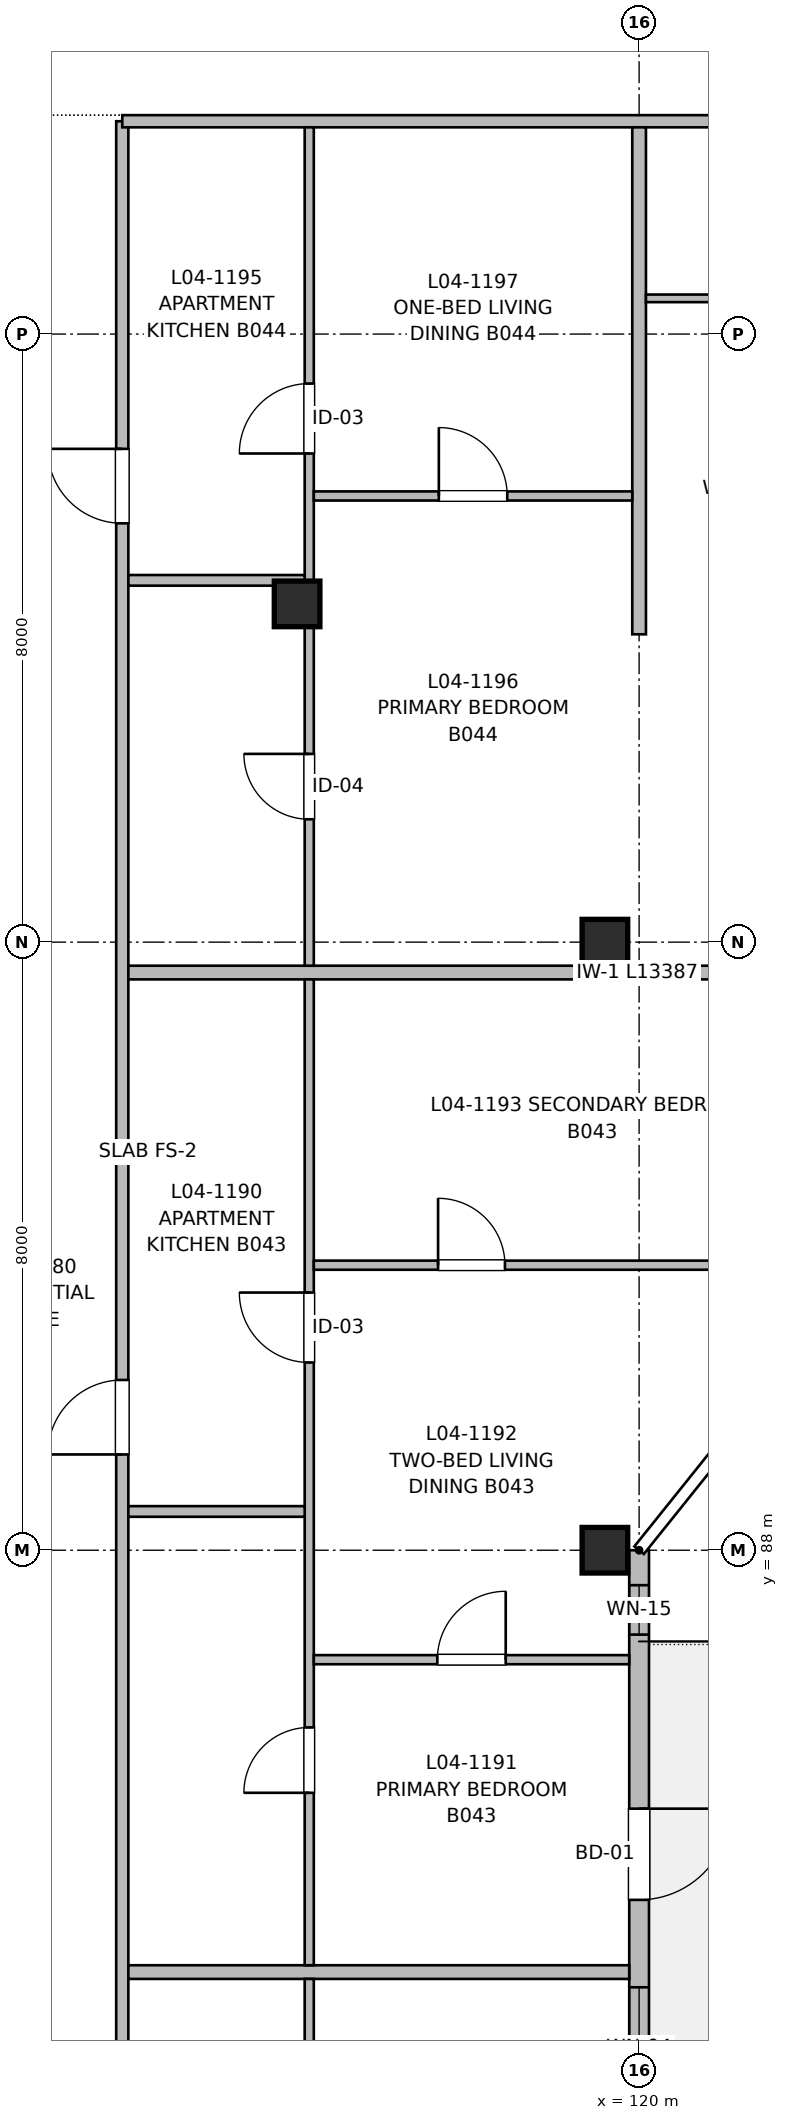
"""IFC4 building model, lengths in metres.
Left out: names, types, materials, properties, quantities, classifications, styles, units other than length and angle.
Written with IfcOpenShell. Run it as: python <this file> out.ifc"""

import sys

from ifc_helpers import new_model, si_unit, direction, frame, frame_2d, origin, origin_2d, place, context, subcontext, project, spatial, rectangle, extrude, element, fill, save


model = new_model("IFC4")
c1 = context("Model", 3, precision=1e-05, world=origin(), true_north=direction((0.0, 1.0)))
c2 = subcontext(c1, "Body", "Model", "MODEL_VIEW")
j1 = project(units=[si_unit("LENGTHUNIT", "METRE"), si_unit("PLANEANGLEUNIT", "RADIAN")], contexts=[c1])
p1 = place(None, origin())
s1 = spatial("IfcSite", under=j1, at=p1, CompositionType="ELEMENT")
p2 = place(p1, origin())
s2 = spatial("IfcBuilding", under=s1, at=p2, CompositionType="ELEMENT")
p3 = place(p2, frame((0.0, 0.0, 13.76)))
s3 = spatial("IfcBuildingStorey", under=s2, at=p3, CompositionType="ELEMENT", Elevation=13.76)
for number, where, z_axis, x_axis in (
    (1, (115.5, 100.45, 0.0), (0.0, 0.0, 1.0), (1.0, 0.0, 0.0)),
    (2, (119.55, 88.0, 0.0), (0.0, 0.0, 1.0), (1.0, 0.0, 0.0)),
    (3, (119.55, 96.0, 0.0), (0.0, 0.0, 1.0), (1.0, 0.0, 0.0)),
):
    element("IfcColumn", number, at=place(p3, frame(where, z_axis=z_axis, x_axis=x_axis)), inside=s3, PredefinedType="COLUMN", context=c2, shape_type="SweptSolid", body=[
        extrude(rectangle(XDim=0.6, YDim=0.6, at=origin_2d()), origin(), (0.0, 0.0, 1.0), 3.2),
    ])
p4 = place(p3, frame((120.0, 88.0, 0.0), z_axis=(0.0, 0.0, 1.0), x_axis=(0.0, -1.0, 0.0)))
e4 = element("IfcWall", 4, at=p4, inside=s3, PredefinedType="SOLIDWALL", context=c2, shape_type="SweptSolid", body=[
    extrude(rectangle(XDim=32.0, YDim=0.26, at=frame_2d((16.0, 0.0))), origin(), (0.0, 0.0, 1.0), 2.98),
])
p5 = place(p4, frame((3.4, 0.0, 0.0)))
e5 = element("IfcOpeningElement", 5, at=p5, cuts=e4, PredefinedType="OPENING", context=c2, shape_type="SweptSolid", body=[
    extrude(rectangle(XDim=1.2, YDim=2.2, at=frame_2d((0.6, 1.1))), frame((0.0, 0.14, 0.0), z_axis=(0.0, -1.0, 0.0), x_axis=(1.0, 0.0, 0.0)), (0.0, 0.0, 1.0), 0.28),
])
p6 = place(p4, frame((5.75, 0.0, 0.77)))
e6 = element("IfcOpeningElement", 6, at=p6, cuts=e4, PredefinedType="OPENING", context=c2, shape_type="SweptSolid", body=[
    extrude(rectangle(XDim=1.6, YDim=1.45, at=frame_2d((0.8, 0.725))), frame((0.0, 0.14, 0.0), z_axis=(0.0, -1.0, 0.0), x_axis=(1.0, 0.0, 0.0)), (0.0, 0.0, 1.0), 0.28),
])
p7 = place(p4, frame((11.275, 0.0, 0.77)))
e7 = element("IfcOpeningElement", 7, at=p7, cuts=e4, PredefinedType="OPENING", context=c2, shape_type="SweptSolid", body=[
    extrude(rectangle(XDim=1.45, YDim=1.45, at=frame_2d((0.725, 0.725))), frame((0.0, 0.14, 0.0), z_axis=(0.0, -1.0, 0.0), x_axis=(1.0, 0.0, 0.0)), (0.0, 0.0, 1.0), 0.28),
])
p8 = place(p4, frame((19.875, 0.0, 0.72)))
e8 = element("IfcOpeningElement", 8, at=p8, cuts=e4, PredefinedType="OPENING", context=c2, shape_type="SweptSolid", body=[
    extrude(rectangle(XDim=1.95, YDim=1.5, at=frame_2d((0.975, 0.75))), frame((0.0, 0.14, 0.0), z_axis=(0.0, -1.0, 0.0), x_axis=(1.0, 0.0, 0.0)), (0.0, 0.0, 1.0), 0.28),
])
p9 = place(p4, frame((26.7, 0.0, 0.67)))
e9 = element("IfcOpeningElement", 9, at=p9, cuts=e4, PredefinedType="OPENING", context=c2, shape_type="SweptSolid", body=[
    extrude(rectangle(XDim=2.6, YDim=1.55, at=frame_2d((1.3, 0.775))), frame((0.0, 0.14, 0.0), z_axis=(0.0, -1.0, 0.0), x_axis=(1.0, 0.0, 0.0)), (0.0, 0.0, 1.0), 0.28),
])
p10 = place(p4, frame((16.73, 0.0, 0.82)))
e10 = element("IfcOpeningElement", 10, at=p10, cuts=e4, PredefinedType="OPENING", context=c2, shape_type="SweptSolid", body=[
    extrude(rectangle(XDim=1.5, YDim=1.4, at=frame_2d((0.75, 0.7))), frame((0.0, 0.14, 0.0), z_axis=(0.0, -1.0, 0.0), x_axis=(1.0, 0.0, 0.0)), (0.0, 0.0, 1.0), 0.28),
])
p11 = place(p4, frame((0.46, 0.0, 0.9)))
e11 = element("IfcOpeningElement", 11, at=p11, cuts=e4, PredefinedType="OPENING", context=c2, shape_type="SweptSolid", body=[
    extrude(rectangle(XDim=0.65, YDim=0.95, at=frame_2d((0.325, 0.475))), frame((0.0, 0.14, 0.0), z_axis=(0.0, -1.0, 0.0), x_axis=(1.0, 0.0, 0.0)), (0.0, 0.0, 1.0), 0.28),
])
p12 = place(p3, frame((113.2, 56.16, 0.0), z_axis=(0.0, 0.0, 1.0), x_axis=(0.0, 1.0, 0.0)))
e12 = element("IfcWall", 12, at=p12, inside=s3, PredefinedType="PARTITIONING", context=c2, shape_type="SweptSolid", body=[
    extrude(rectangle(XDim=50.64, YDim=0.16, at=frame_2d((25.32, 0.0))), origin(), (0.0, 0.0, 1.0), 2.935),
])
p13 = place(p12, frame((5.27, 0.0, 0.0)))
e13 = element("IfcOpeningElement", 13, at=p13, cuts=e12, PredefinedType="OPENING", context=c2, shape_type="SweptSolid", body=[
    extrude(rectangle(XDim=1.5, YDim=2.2, at=frame_2d((0.75, 1.1))), frame((0.0, 0.09, 0.0), z_axis=(0.0, -1.0, 0.0), x_axis=(1.0, 0.0, 0.0)), (0.0, 0.0, 1.0), 0.18),
])
p14 = place(p12, frame((19.4, 0.0, 0.0)))
e14 = element("IfcOpeningElement", 14, at=p14, cuts=e12, PredefinedType="OPENING", context=c2, shape_type="SweptSolid", body=[
    extrude(rectangle(XDim=0.98, YDim=2.15, at=frame_2d((0.49, 1.075))), frame((0.0, 0.09, 0.0), z_axis=(0.0, -1.0, 0.0), x_axis=(1.0, 0.0, 0.0)), (0.0, 0.0, 1.0), 0.18),
])
p15 = place(p12, frame((33.1, 0.0, 0.0)))
e15 = element("IfcOpeningElement", 15, at=p15, cuts=e12, PredefinedType="OPENING", context=c2, shape_type="SweptSolid", body=[
    extrude(rectangle(XDim=0.98, YDim=2.15, at=frame_2d((0.49, 1.075))), frame((0.0, 0.09, 0.0), z_axis=(0.0, -1.0, 0.0), x_axis=(1.0, 0.0, 0.0)), (0.0, 0.0, 1.0), 0.18),
])
p16 = place(p12, frame((45.35, 0.0, 0.0)))
e16 = element("IfcOpeningElement", 16, at=p16, cuts=e12, PredefinedType="OPENING", context=c2, shape_type="SweptSolid", body=[
    extrude(rectangle(XDim=0.98, YDim=2.15, at=frame_2d((0.49, 1.075))), frame((0.0, 0.09, 0.0), z_axis=(0.0, -1.0, 0.0), x_axis=(1.0, 0.0, 0.0)), (0.0, 0.0, 1.0), 0.18),
])
p17 = place(p3, frame((113.2, 106.8, 0.0), z_axis=(0.0, 0.0, 1.0), x_axis=(1.0, 0.0, 0.0)))
e17 = element("IfcWall", 17, at=p17, inside=s3, PredefinedType="PARTITIONING", context=c2, shape_type="SweptSolid", body=[
    extrude(rectangle(XDim=24.14, YDim=0.16, at=frame_2d((12.07, 0.0))), origin(), (0.0, 0.0, 1.0), 2.935),
])
p18 = place(p17, frame((19.575, 0.0, 0.0)))
e18 = element("IfcOpeningElement", 18, at=p18, cuts=e17, PredefinedType="OPENING", context=c2, shape_type="SweptSolid", body=[
    extrude(rectangle(XDim=1.05, YDim=2.15, at=frame_2d((0.525, 1.075))), frame((0.0, 0.09, 0.0), z_axis=(0.0, -1.0, 0.0), x_axis=(1.0, 0.0, 0.0)), (0.0, 0.0, 1.0), 0.18),
])
p19 = place(p17, frame((8.995, 0.0, 0.0)))
e19 = element("IfcOpeningElement", 19, at=p19, cuts=e17, PredefinedType="OPENING", context=c2, shape_type="SweptSolid", body=[
    extrude(rectangle(XDim=0.98, YDim=2.15, at=frame_2d((0.49, 1.075))), frame((0.0, 0.09, 0.0), z_axis=(0.0, -1.0, 0.0), x_axis=(1.0, 0.0, 0.0)), (0.0, 0.0, 1.0), 0.18),
])
p20 = place(p3, frame((120.0, 100.05, 0.0), z_axis=(0.0, 0.0, 1.0), x_axis=(0.0, 1.0, 0.0)))
e20 = element("IfcWall", 20, at=p20, inside=s3, PredefinedType="PARTITIONING", context=c2, shape_type="SweptSolid", body=[
    extrude(rectangle(XDim=6.67, YDim=0.18, at=frame_2d((3.335, 0.0))), origin(), (0.0, 0.0, 1.0), 2.935),
])
p21 = place(p3, frame((113.28, 82.45, 0.0), z_axis=(0.0, 0.0, 1.0), x_axis=(1.0, 0.0, 0.0)))
e21 = element("IfcWall", 21, at=p21, inside=s3, PredefinedType="PARTITIONING", context=c2, shape_type="SweptSolid", body=[
    extrude(rectangle(XDim=6.59, YDim=0.18, at=frame_2d((3.295, 0.0))), origin(), (0.0, 0.0, 1.0), 2.935),
])
p22 = place(p3, frame((113.28, 95.6, 0.0), z_axis=(0.0, 0.0, 1.0), x_axis=(1.0, 0.0, 0.0)))
e22 = element("IfcWall", 22, at=p22, inside=s3, PredefinedType="PARTITIONING", context=c2, shape_type="SweptSolid", body=[
    extrude(rectangle(XDim=13.387, YDim=0.18, at=frame_2d((6.694, 0.0))), origin(), (0.0, 0.0, 1.0), 2.935),
])
p23 = place(p3, frame((115.66, 68.38, 0.0), z_axis=(0.0, 0.0, 1.0), x_axis=(0.0, 1.0, 0.0)))
e23 = element("IfcWall", 23, at=p23, inside=s3, PredefinedType="PARTITIONING", context=c2, shape_type="SweptSolid", body=[
    extrude(rectangle(XDim=13.98, YDim=0.12, at=frame_2d((6.99, 0.0))), origin(), (0.0, 0.0, 1.0), 2.935),
])
p24 = place(p23, frame((2.443, 0.0, 0.0)))
e24 = element("IfcOpeningElement", 24, at=p24, cuts=e23, PredefinedType="OPENING", context=c2, shape_type="SweptSolid", body=[
    extrude(rectangle(XDim=0.86, YDim=2.1, at=frame_2d((0.43, 1.05))), frame((0.0, 0.07, 0.0), z_axis=(0.0, -1.0, 0.0), x_axis=(1.0, 0.0, 0.0)), (0.0, 0.0, 1.0), 0.14),
])
p25 = place(p23, frame((8.544, 0.0, 0.0)))
e25 = element("IfcOpeningElement", 25, at=p25, cuts=e23, PredefinedType="OPENING", context=c2, shape_type="SweptSolid", body=[
    extrude(rectangle(XDim=0.92, YDim=2.1, at=frame_2d((0.46, 1.05))), frame((0.0, 0.07, 0.0), z_axis=(0.0, -1.0, 0.0), x_axis=(1.0, 0.0, 0.0)), (0.0, 0.0, 1.0), 0.14),
])
p26 = place(p3, frame((115.66, 82.54, 0.0), z_axis=(0.0, 0.0, 1.0), x_axis=(0.0, 1.0, 0.0)))
e26 = element("IfcWall", 26, at=p26, inside=s3, PredefinedType="PARTITIONING", context=c2, shape_type="SweptSolid", body=[
    extrude(rectangle(XDim=12.97, YDim=0.12, at=frame_2d((6.485, 0.0))), origin(), (0.0, 0.0, 1.0), 2.935),
])
p27 = place(p26, frame((2.269, 0.0, 0.0)))
e27 = element("IfcOpeningElement", 27, at=p27, cuts=e26, PredefinedType="OPENING", context=c2, shape_type="SweptSolid", body=[
    extrude(rectangle(XDim=0.86, YDim=2.1, at=frame_2d((0.43, 1.05))), frame((0.0, 0.07, 0.0), z_axis=(0.0, -1.0, 0.0), x_axis=(1.0, 0.0, 0.0)), (0.0, 0.0, 1.0), 0.14),
])
p28 = place(p26, frame((7.93, 0.0, 0.0)))
e28 = element("IfcOpeningElement", 28, at=p28, cuts=e26, PredefinedType="OPENING", context=c2, shape_type="SweptSolid", body=[
    extrude(rectangle(XDim=0.92, YDim=2.1, at=frame_2d((0.46, 1.05))), frame((0.0, 0.07, 0.0), z_axis=(0.0, -1.0, 0.0), x_axis=(1.0, 0.0, 0.0)), (0.0, 0.0, 1.0), 0.14),
])
p29 = place(p3, frame((113.28, 88.51, 0.0), z_axis=(0.0, 0.0, 1.0), x_axis=(1.0, 0.0, 0.0)))
e29 = element("IfcWall", 29, at=p29, inside=s3, PredefinedType="PARTITIONING", context=c2, shape_type="SweptSolid", body=[
    extrude(rectangle(XDim=2.32, YDim=0.14, at=frame_2d((1.16, 0.0))), origin(), (0.0, 0.0, 1.0), 2.935),
])
p30 = place(p3, frame((115.72, 86.56, 0.0), z_axis=(0.0, 0.0, 1.0), x_axis=(1.0, 0.0, 0.0)))
e30 = element("IfcWall", 30, at=p30, inside=s3, PredefinedType="PARTITIONING", context=c2, shape_type="SweptSolid", body=[
    extrude(rectangle(XDim=4.15, YDim=0.12, at=frame_2d((2.075, 0.0))), origin(), (0.0, 0.0, 1.0), 2.935),
])
p31 = place(p30, frame((1.625, 0.0, 0.0)))
e31 = element("IfcOpeningElement", 31, at=p31, cuts=e30, PredefinedType="OPENING", context=c2, shape_type="SweptSolid", body=[
    extrude(rectangle(XDim=0.9, YDim=2.1, at=frame_2d((0.45, 1.05))), frame((0.0, 0.07, 0.0), z_axis=(0.0, -1.0, 0.0), x_axis=(1.0, 0.0, 0.0)), (0.0, 0.0, 1.0), 0.14),
])
p32 = place(p3, frame((115.72, 91.75, 0.0), z_axis=(0.0, 0.0, 1.0), x_axis=(1.0, 0.0, 0.0)))
e32 = element("IfcWall", 32, at=p32, inside=s3, PredefinedType="PARTITIONING", context=c2, shape_type="SweptSolid", body=[
    extrude(rectangle(XDim=7.237, YDim=0.12, at=frame_2d((3.619, 0.0))), origin(), (0.0, 0.0, 1.0), 2.935),
])
p33 = place(p32, frame((1.635, 0.0, 0.0)))
e33 = element("IfcOpeningElement", 33, at=p33, cuts=e32, PredefinedType="OPENING", context=c2, shape_type="SweptSolid", body=[
    extrude(rectangle(XDim=0.88, YDim=2.1, at=frame_2d((0.44, 1.05))), frame((0.0, 0.07, 0.0), z_axis=(0.0, -1.0, 0.0), x_axis=(1.0, 0.0, 0.0)), (0.0, 0.0, 1.0), 0.14),
])
p34 = place(p3, frame((115.66, 95.69, 0.0), z_axis=(0.0, 0.0, 1.0), x_axis=(0.0, 1.0, 0.0)))
e34 = element("IfcWall", 34, at=p34, inside=s3, PredefinedType="PARTITIONING", context=c2, shape_type="SweptSolid", body=[
    extrude(rectangle(XDim=11.03, YDim=0.12, at=frame_2d((5.515, 0.0))), origin(), (0.0, 0.0, 1.0), 2.68),
])
p35 = place(p34, frame((1.927, 0.0, 0.0)))
e35 = element("IfcOpeningElement", 35, at=p35, cuts=e34, PredefinedType="OPENING", context=c2, shape_type="SweptSolid", body=[
    extrude(rectangle(XDim=0.86, YDim=2.1, at=frame_2d((0.43, 1.05))), frame((0.0, 0.07, 0.0), z_axis=(0.0, -1.0, 0.0), x_axis=(1.0, 0.0, 0.0)), (0.0, 0.0, 1.0), 0.14),
])
p36 = place(p34, frame((6.739, 0.0, 0.0)))
e36 = element("IfcOpeningElement", 36, at=p36, cuts=e34, PredefinedType="OPENING", context=c2, shape_type="SweptSolid", body=[
    extrude(rectangle(XDim=0.92, YDim=2.1, at=frame_2d((0.46, 1.05))), frame((0.0, 0.07, 0.0), z_axis=(0.0, -1.0, 0.0), x_axis=(1.0, 0.0, 0.0)), (0.0, 0.0, 1.0), 0.14),
])
p37 = place(p3, frame((113.28, 100.76, 0.0), z_axis=(0.0, 0.0, 1.0), x_axis=(1.0, 0.0, 0.0)))
e37 = element("IfcWall", 37, at=p37, inside=s3, PredefinedType="PARTITIONING", context=c2, shape_type="SweptSolid", body=[
    extrude(rectangle(XDim=2.32, YDim=0.14, at=frame_2d((1.16, 0.0))), origin(), (0.0, 0.0, 1.0), 2.935),
])
p38 = place(p3, frame((115.72, 101.87, 0.0), z_axis=(0.0, 0.0, 1.0), x_axis=(1.0, 0.0, 0.0)))
e38 = element("IfcWall", 38, at=p38, inside=s3, PredefinedType="PARTITIONING", context=c2, shape_type="SweptSolid", body=[
    extrude(rectangle(XDim=4.19, YDim=0.12, at=frame_2d((2.095, 0.0))), origin(), (0.0, 0.0, 1.0), 2.935),
])
p39 = place(p38, frame((1.645, 0.0, 0.0)))
e39 = element("IfcOpeningElement", 39, at=p39, cuts=e38, PredefinedType="OPENING", context=c2, shape_type="SweptSolid", body=[
    extrude(rectangle(XDim=0.9, YDim=2.1, at=frame_2d((0.45, 1.05))), frame((0.0, 0.07, 0.0), z_axis=(0.0, -1.0, 0.0), x_axis=(1.0, 0.0, 0.0)), (0.0, 0.0, 1.0), 0.14),
])
p40 = place(p3, frame((120.09, 104.47, 0.0), z_axis=(0.0, 0.0, 1.0), x_axis=(1.0, 0.0, 0.0)))
e40 = element("IfcWall", 40, at=p40, inside=s3, PredefinedType="PARTITIONING", context=c2, shape_type="SweptSolid", body=[
    extrude(rectangle(XDim=5.13, YDim=0.1, at=frame_2d((2.565, 0.0))), origin(), (0.0, 0.0, 1.0), 2.935),
])
p41 = place(p40, frame((2.18, 0.0, 0.0)))
e41 = element("IfcOpeningElement", 41, at=p41, cuts=e40, PredefinedType="OPENING", context=c2, shape_type="SweptSolid", body=[
    extrude(rectangle(XDim=0.92, YDim=2.1, at=frame_2d((0.46, 1.05))), frame((0.0, 0.06, 0.0), z_axis=(0.0, -1.0, 0.0), x_axis=(1.0, 0.0, 0.0)), (0.0, 0.0, 1.0), 0.12),
])
p42 = place(p5, origin())
e42 = element("IfcDoor", 42, at=p42, inside=s3, OperationType="SINGLE_SWING_LEFT", PredefinedType="DOOR", context=c2, shape_type="SweptSolid", body=[
    extrude(rectangle(XDim=1.2, YDim=2.2, at=frame_2d((0.6, 1.1))), frame((0.0, 0.025, 0.0), z_axis=(0.0, -1.0, 0.0), x_axis=(1.0, 0.0, 0.0)), (0.0, 0.0, 1.0), 0.05),
])
fill(e5, e42)
p43 = place(p6, origin())
e43 = element("IfcWindow", 43, at=p43, inside=s3, PartitioningType="SINGLE_PANEL", PredefinedType="WINDOW", context=c2, shape_type="SweptSolid", body=[
    extrude(rectangle(XDim=1.6, YDim=1.45, at=frame_2d((0.8, 0.725))), frame((0.0, 0.03, 0.0), z_axis=(0.0, -1.0, 0.0), x_axis=(1.0, 0.0, 0.0)), (0.0, 0.0, 1.0), 0.06),
])
fill(e6, e43)
p44 = place(p27, origin())
e44 = element("IfcDoor", 44, at=p44, inside=s3, OperationType="SINGLE_SWING_LEFT", PredefinedType="DOOR", context=c2, shape_type="SweptSolid", body=[
    extrude(rectangle(XDim=0.86, YDim=2.1, at=frame_2d((0.43, 1.05))), frame((0.0, 0.025, 0.0), z_axis=(0.0, -1.0, 0.0), x_axis=(1.0, 0.0, 0.0)), (0.0, 0.0, 1.0), 0.05),
])
fill(e27, e44)
p45 = place(p28, origin())
e45 = element("IfcDoor", 45, at=p45, inside=s3, OperationType="SINGLE_SWING_RIGHT", PredefinedType="DOOR", context=c2, shape_type="SweptSolid", body=[
    extrude(rectangle(XDim=0.92, YDim=2.1, at=frame_2d((0.46, 1.05))), frame((0.0, 0.025, 0.0), z_axis=(0.0, -1.0, 0.0), x_axis=(1.0, 0.0, 0.0)), (0.0, 0.0, 1.0), 0.05),
])
fill(e28, e45)
p46 = place(p15, origin())
e46 = element("IfcDoor", 46, at=p46, inside=s3, OperationType="SINGLE_SWING_LEFT", PredefinedType="DOOR", context=c2, shape_type="SweptSolid", body=[
    extrude(rectangle(XDim=0.98, YDim=2.15, at=frame_2d((0.49, 1.075))), frame((0.0, 0.025, 0.0), z_axis=(0.0, -1.0, 0.0), x_axis=(1.0, 0.0, 0.0)), (0.0, 0.0, 1.0), 0.05),
])
fill(e15, e46)
p47 = place(p31, origin())
e47 = element("IfcDoor", 47, at=p47, inside=s3, OperationType="SINGLE_SWING_RIGHT", PredefinedType="DOOR", context=c2, shape_type="SweptSolid", body=[
    extrude(rectangle(XDim=0.9, YDim=2.1, at=frame_2d((0.45, 1.05))), frame((0.0, 0.025, 0.0), z_axis=(0.0, -1.0, 0.0), x_axis=(1.0, 0.0, 0.0)), (0.0, 0.0, 1.0), 0.05),
])
fill(e31, e47)
p48 = place(p33, origin())
e48 = element("IfcDoor", 48, at=p48, inside=s3, OperationType="SINGLE_SWING_LEFT", PredefinedType="DOOR", context=c2, shape_type="SweptSolid", body=[
    extrude(rectangle(XDim=0.88, YDim=2.1, at=frame_2d((0.44, 1.05))), frame((0.0, 0.025, 0.0), z_axis=(0.0, -1.0, 0.0), x_axis=(1.0, 0.0, 0.0)), (0.0, 0.0, 1.0), 0.05),
])
fill(e33, e48)
p49 = place(p35, origin())
e49 = element("IfcDoor", 49, at=p49, inside=s3, OperationType="SINGLE_SWING_RIGHT", PredefinedType="DOOR", context=c2, shape_type="SweptSolid", body=[
    extrude(rectangle(XDim=0.86, YDim=2.1, at=frame_2d((0.43, 1.05))), frame((0.0, 0.025, 0.0), z_axis=(0.0, -1.0, 0.0), x_axis=(1.0, 0.0, 0.0)), (0.0, 0.0, 1.0), 0.05),
])
fill(e35, e49)
p50 = place(p36, origin())
e50 = element("IfcDoor", 50, at=p50, inside=s3, OperationType="SINGLE_SWING_LEFT", PredefinedType="DOOR", context=c2, shape_type="SweptSolid", body=[
    extrude(rectangle(XDim=0.92, YDim=2.1, at=frame_2d((0.46, 1.05))), frame((0.0, 0.025, 0.0), z_axis=(0.0, -1.0, 0.0), x_axis=(1.0, 0.0, 0.0)), (0.0, 0.0, 1.0), 0.05),
])
fill(e36, e50)
p51 = place(p16, origin())
e51 = element("IfcDoor", 51, at=p51, inside=s3, OperationType="SINGLE_SWING_RIGHT", PredefinedType="DOOR", context=c2, shape_type="SweptSolid", body=[
    extrude(rectangle(XDim=0.98, YDim=2.15, at=frame_2d((0.49, 1.075))), frame((0.0, 0.025, 0.0), z_axis=(0.0, -1.0, 0.0), x_axis=(1.0, 0.0, 0.0)), (0.0, 0.0, 1.0), 0.05),
])
fill(e16, e51)
p52 = place(p39, origin())
e52 = element("IfcDoor", 52, at=p52, inside=s3, OperationType="SINGLE_SWING_LEFT", PredefinedType="DOOR", context=c2, shape_type="SweptSolid", body=[
    extrude(rectangle(XDim=0.9, YDim=2.1, at=frame_2d((0.45, 1.05))), frame((0.0, 0.025, 0.0), z_axis=(0.0, -1.0, 0.0), x_axis=(1.0, 0.0, 0.0)), (0.0, 0.0, 1.0), 0.05),
])
fill(e39, e52)
p53 = place(p11, origin())
e53 = element("IfcWindow", 53, at=p53, inside=s3, PartitioningType="SINGLE_PANEL", PredefinedType="WINDOW", context=c2, shape_type="SweptSolid", body=[
    extrude(rectangle(XDim=0.65, YDim=0.95, at=frame_2d((0.325, 0.475))), frame((0.0, 0.03, 0.0), z_axis=(0.0, -1.0, 0.0), x_axis=(1.0, 0.0, 0.0)), (0.0, 0.0, 1.0), 0.06),
])
fill(e11, e53)
save(model, sys.argv[1])
